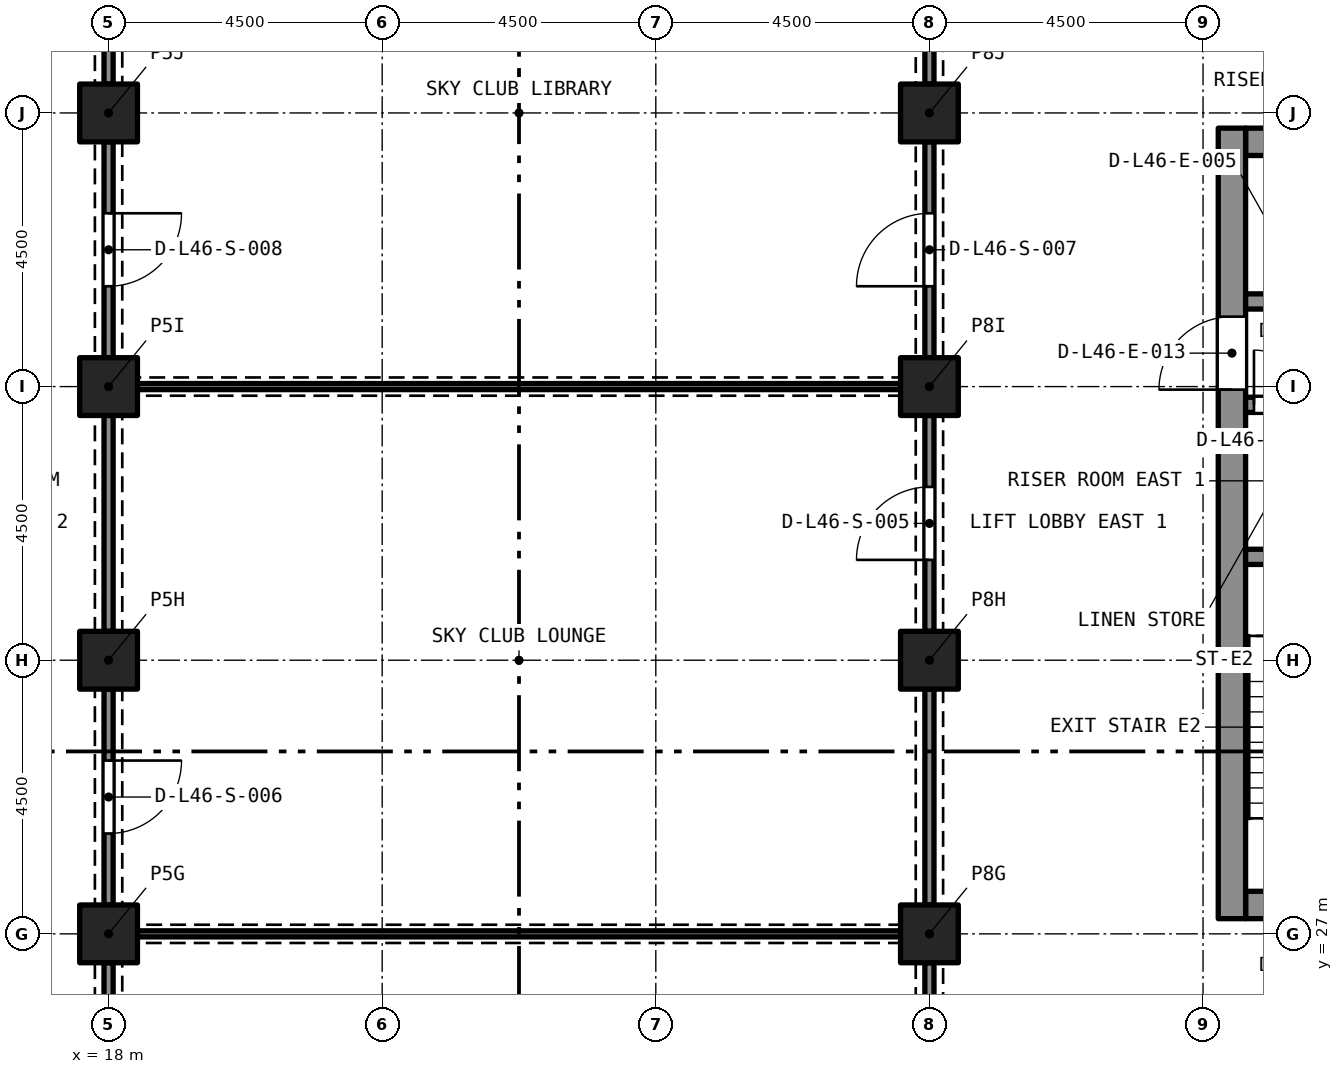
"""IFC4 building model, lengths in metres.
Left out: names, types, materials, properties, quantities, classifications, styles, units other than length and angle.
Written with IfcOpenShell. Run it as: python <this file> out.ifc"""

import sys

from ifc_helpers import new_model, si_unit, direction, frame, frame_2d, origin, origin_2d, place, context, subcontext, project, spatial, rectangle, extrude, element, fill, save


model = new_model("IFC4")
c1 = context("Model", 3, precision=1e-05, world=origin(), true_north=direction((0.0, 1.0)))
c2 = subcontext(c1, "Body", "Model", "MODEL_VIEW")
j1 = project(units=[si_unit("LENGTHUNIT", "METRE"), si_unit("PLANEANGLEUNIT", "RADIAN")], contexts=[c1])
p1 = place(None, origin())
s1 = spatial("IfcSite", under=j1, at=p1, CompositionType="ELEMENT")
p2 = place(p1, origin())
s2 = spatial("IfcBuilding", under=s1, at=p2, CompositionType="ELEMENT")
p3 = place(p2, frame((0.0, 0.0, 168.2)))
s3 = spatial("IfcBuildingStorey", under=s2, at=p3, CompositionType="ELEMENT", Elevation=168.2)
for number, where, z_axis, x_axis in (
    (1, (18.0, 27.0, 0.0), (0.0, 0.0, 1.0), (1.0, 0.0, 0.0)),
    (2, (31.5, 27.0, 0.0), (0.0, 0.0, 1.0), (1.0, 0.0, 0.0)),
    (3, (18.0, 31.5, 0.0), (0.0, 0.0, 1.0), (1.0, 0.0, 0.0)),
    (4, (31.5, 31.5, 0.0), (0.0, 0.0, 1.0), (1.0, 0.0, 0.0)),
    (5, (18.0, 36.0, 0.0), (0.0, 0.0, 1.0), (1.0, 0.0, 0.0)),
    (6, (31.5, 36.0, 0.0), (0.0, 0.0, 1.0), (1.0, 0.0, 0.0)),
    (7, (18.0, 40.5, 0.0), (0.0, 0.0, 1.0), (1.0, 0.0, 0.0)),
    (8, (31.5, 40.5, 0.0), (0.0, 0.0, 1.0), (1.0, 0.0, 0.0)),
):
    element("IfcColumn", number, at=place(p3, frame(where, z_axis=z_axis, x_axis=x_axis)), inside=s3, PredefinedType="COLUMN", context=c2, shape_type="SweptSolid", body=[
        extrude(rectangle(XDim=0.95, YDim=0.95, at=origin_2d()), origin(), (0.0, 0.0, 1.0), 4.4),
    ])
p4 = place(p3, frame((36.7, 27.475, 0.0), z_axis=(0.0, 0.0, 1.0), x_axis=(1.0, 0.0, 0.0)))
e9 = element("IfcWall", 9, at=p4, inside=s3, PredefinedType="SOLIDWALL", context=c2, shape_type="SweptSolid", body=[
    extrude(rectangle(XDim=7.6, YDim=0.45, at=frame_2d((3.8, 0.0))), origin(), (0.0, 0.0, 1.0), 4.4),
])
p5 = place(p4, frame((5.775, 0.0, 0.0)))
e10 = element("IfcOpeningElement", 10, at=p5, cuts=e9, PredefinedType="OPENING", context=c2, shape_type="SweptSolid", body=[
    extrude(rectangle(XDim=1.1, YDim=2.1, at=frame_2d((0.55, 1.05))), frame((0.0, 0.235, 0.0), z_axis=(0.0, -1.0, 0.0), x_axis=(1.0, 0.0, 0.0)), (0.0, 0.0, 1.0), 0.47),
])
p6 = place(p4, frame((3.25, 0.0, 0.0)))
e11 = element("IfcOpeningElement", 11, at=p6, cuts=e9, PredefinedType="OPENING", context=c2, shape_type="SweptSolid", body=[
    extrude(rectangle(XDim=1.1, YDim=2.1, at=frame_2d((0.55, 1.05))), frame((0.0, 0.235, 0.0), z_axis=(0.0, -1.0, 0.0), x_axis=(1.0, 0.0, 0.0)), (0.0, 0.0, 1.0), 0.47),
])
p7 = place(p4, frame((0.725, 0.0, 0.0)))
e12 = element("IfcOpeningElement", 12, at=p7, cuts=e9, PredefinedType="OPENING", context=c2, shape_type="SweptSolid", body=[
    extrude(rectangle(XDim=1.1, YDim=2.1, at=frame_2d((0.55, 1.05))), frame((0.0, 0.235, 0.0), z_axis=(0.0, -1.0, 0.0), x_axis=(1.0, 0.0, 0.0)), (0.0, 0.0, 1.0), 0.47),
])
p8 = place(p3, frame((36.7, 40.025, 0.0), z_axis=(0.0, 0.0, 1.0), x_axis=(1.0, 0.0, 0.0)))
e13 = element("IfcWall", 13, at=p8, inside=s3, PredefinedType="SOLIDWALL", context=c2, shape_type="SweptSolid", body=[
    extrude(rectangle(XDim=7.6, YDim=0.45, at=frame_2d((3.8, 0.0))), origin(), (0.0, 0.0, 1.0), 4.4),
])
p9 = place(p3, frame((36.475, 27.25, 0.0), z_axis=(0.0, 0.0, 1.0), x_axis=(0.0, 1.0, 0.0)))
e14 = element("IfcWall", 14, at=p9, inside=s3, PredefinedType="SOLIDWALL", context=c2, shape_type="SweptSolid", body=[
    extrude(rectangle(XDim=13.0, YDim=0.45, at=frame_2d((6.5, 0.0))), origin(), (0.0, 0.0, 1.0), 4.4),
])
p10 = place(p9, frame((8.7, 0.0, 0.0)))
e15 = element("IfcOpeningElement", 15, at=p10, cuts=e14, PredefinedType="OPENING", context=c2, shape_type="SweptSolid", body=[
    extrude(rectangle(XDim=1.2, YDim=2.1, at=frame_2d((0.6, 1.05))), frame((0.0, 0.235, 0.0), z_axis=(0.0, -1.0, 0.0), x_axis=(1.0, 0.0, 0.0)), (0.0, 0.0, 1.0), 0.47),
])
p11 = place(p3, frame((36.7, 33.2, 0.0), z_axis=(0.0, 0.0, 1.0), x_axis=(1.0, 0.0, 0.0)))
e16 = element("IfcWall", 16, at=p11, inside=s3, PredefinedType="SOLIDWALL", context=c2, shape_type="SweptSolid", body=[
    extrude(rectangle(XDim=7.6, YDim=0.25, at=frame_2d((3.8, 0.0))), origin(), (0.0, 0.0, 1.0), 4.1),
])
p12 = place(p11, frame((3.3, 0.0, 0.0)))
e17 = element("IfcOpeningElement", 17, at=p12, cuts=e16, PredefinedType="OPENING", context=c2, shape_type="SweptSolid", body=[
    extrude(rectangle(XDim=1.0, YDim=2.1, at=frame_2d((0.5, 1.05))), frame((0.0, 0.135, 0.0), z_axis=(0.0, -1.0, 0.0), x_axis=(1.0, 0.0, 0.0)), (0.0, 0.0, 1.0), 0.27),
])
p13 = place(p3, frame((36.7, 35.7, 0.0), z_axis=(0.0, 0.0, 1.0), x_axis=(1.0, 0.0, 0.0)))
e18 = element("IfcWall", 18, at=p13, inside=s3, PredefinedType="SOLIDWALL", context=c2, shape_type="SweptSolid", body=[
    extrude(rectangle(XDim=7.6, YDim=0.25, at=frame_2d((3.8, 0.0))), origin(), (0.0, 0.0, 1.0), 4.1),
])
p14 = place(p13, frame((5.775, 0.0, 0.0)))
e19 = element("IfcOpeningElement", 19, at=p14, cuts=e18, PredefinedType="OPENING", context=c2, shape_type="SweptSolid", body=[
    extrude(rectangle(XDim=1.1, YDim=2.4, at=frame_2d((0.55, 1.2))), frame((0.0, 0.135, 0.0), z_axis=(0.0, -1.0, 0.0), x_axis=(1.0, 0.0, 0.0)), (0.0, 0.0, 1.0), 0.27),
])
p15 = place(p13, frame((1.512, 0.0, 0.0)))
e20 = element("IfcOpeningElement", 20, at=p15, cuts=e18, PredefinedType="OPENING", context=c2, shape_type="SweptSolid", body=[
    extrude(rectangle(XDim=0.9, YDim=2.1, at=frame_2d((0.45, 1.05))), frame((0.0, 0.135, 0.0), z_axis=(0.0, -1.0, 0.0), x_axis=(1.0, 0.0, 0.0)), (0.0, 0.0, 1.0), 0.27),
])
p16 = place(p13, frame((0.137, 0.0, 0.0)))
e21 = element("IfcOpeningElement", 21, at=p16, cuts=e18, PredefinedType="OPENING", context=c2, shape_type="SweptSolid", body=[
    extrude(rectangle(XDim=0.9, YDim=2.1, at=frame_2d((0.45, 1.05))), frame((0.0, 0.135, 0.0), z_axis=(0.0, -1.0, 0.0), x_axis=(1.0, 0.0, 0.0)), (0.0, 0.0, 1.0), 0.27),
])
p17 = place(p3, frame((36.7, 37.4, 0.0), z_axis=(0.0, 0.0, 1.0), x_axis=(1.0, 0.0, 0.0)))
e22 = element("IfcWall", 22, at=p17, inside=s3, PredefinedType="SOLIDWALL", context=c2, shape_type="SweptSolid", body=[
    extrude(rectangle(XDim=7.6, YDim=0.25, at=frame_2d((3.8, 0.0))), origin(), (0.0, 0.0, 1.0), 4.1),
])
p18 = place(p17, frame((0.75, 0.0, 0.0)))
e23 = element("IfcOpeningElement", 23, at=p18, cuts=e22, PredefinedType="OPENING", context=c2, shape_type="SweptSolid", body=[
    extrude(rectangle(XDim=0.7, YDim=2.1, at=frame_2d((0.35, 1.05))), frame((0.0, 0.135, 0.0), z_axis=(0.0, -1.0, 0.0), x_axis=(1.0, 0.0, 0.0)), (0.0, 0.0, 1.0), 0.27),
])
p19 = place(p17, frame((5.9, 0.0, 0.0)))
e24 = element("IfcOpeningElement", 24, at=p19, cuts=e22, PredefinedType="OPENING", context=c2, shape_type="SweptSolid", body=[
    extrude(rectangle(XDim=0.9, YDim=2.1, at=frame_2d((0.45, 1.05))), frame((0.0, 0.135, 0.0), z_axis=(0.0, -1.0, 0.0), x_axis=(1.0, 0.0, 0.0)), (0.0, 0.0, 1.0), 0.27),
])
p20 = place(p17, frame((3.2, 0.0, 0.0)))
e25 = element("IfcOpeningElement", 25, at=p20, cuts=e22, PredefinedType="OPENING", context=c2, shape_type="SweptSolid", body=[
    extrude(rectangle(XDim=0.9, YDim=2.1, at=frame_2d((0.45, 1.05))), frame((0.0, 0.135, 0.0), z_axis=(0.0, -1.0, 0.0), x_axis=(1.0, 0.0, 0.0)), (0.0, 0.0, 1.0), 0.27),
])
p21 = place(p3, frame((18.475, 27.0, 0.0), z_axis=(0.0, 0.0, 1.0), x_axis=(1.0, 0.0, 0.0)))
e26 = element("IfcWall", 26, at=p21, inside=s3, PredefinedType="PARTITIONING", context=c2, shape_type="SweptSolid", body=[
    extrude(rectangle(XDim=12.55, YDim=0.1, at=frame_2d((6.275, 0.0))), origin(), (0.0, 0.0, 1.0), 3.95),
])
p22 = place(p3, frame((31.5, 22.975, 0.0), z_axis=(0.0, 0.0, 1.0), x_axis=(0.0, 1.0, 0.0)))
e27 = element("IfcWall", 27, at=p22, inside=s3, PredefinedType="PARTITIONING", context=c2, shape_type="SweptSolid", body=[
    extrude(rectangle(XDim=3.55, YDim=0.15, at=frame_2d((1.775, 0.0))), origin(), (0.0, 0.0, 1.0), 3.58),
])
p23 = place(p22, frame((1.175, 0.0, 0.0)))
e28 = element("IfcOpeningElement", 28, at=p23, cuts=e27, PredefinedType="OPENING", context=c2, shape_type="SweptSolid", body=[
    extrude(rectangle(XDim=1.2, YDim=2.1, at=frame_2d((0.6, 1.05))), frame((0.0, 0.085, 0.0), z_axis=(0.0, -1.0, 0.0), x_axis=(1.0, 0.0, 0.0)), (0.0, 0.0, 1.0), 0.17),
])
p24 = place(p3, frame((18.0, 26.525, 0.0), z_axis=(0.0, 0.0, 1.0), x_axis=(0.0, -1.0, 0.0)))
e29 = element("IfcWall", 29, at=p24, inside=s3, PredefinedType="PARTITIONING", context=c2, shape_type="SweptSolid", body=[
    extrude(rectangle(XDim=3.55, YDim=0.15, at=frame_2d((1.775, 0.0))), origin(), (0.0, 0.0, 1.0), 3.58),
])
p25 = place(p24, frame((1.175, 0.0, 0.0)))
e30 = element("IfcOpeningElement", 30, at=p25, cuts=e29, PredefinedType="OPENING", context=c2, shape_type="SweptSolid", body=[
    extrude(rectangle(XDim=1.2, YDim=2.1, at=frame_2d((0.6, 1.05))), frame((0.0, 0.085, 0.0), z_axis=(0.0, -1.0, 0.0), x_axis=(1.0, 0.0, 0.0)), (0.0, 0.0, 1.0), 0.17),
])
p26 = place(p3, frame((18.475, 36.0, 0.0), z_axis=(0.0, 0.0, 1.0), x_axis=(1.0, 0.0, 0.0)))
e31 = element("IfcWall", 31, at=p26, inside=s3, PredefinedType="PARTITIONING", context=c2, shape_type="SweptSolid", body=[
    extrude(rectangle(XDim=12.55, YDim=0.1, at=frame_2d((6.275, 0.0))), origin(), (0.0, 0.0, 1.0), 3.95),
])
p27 = place(p3, frame((31.5, 31.975, 0.0), z_axis=(0.0, 0.0, 1.0), x_axis=(0.0, 1.0, 0.0)))
e32 = element("IfcWall", 32, at=p27, inside=s3, PredefinedType="PARTITIONING", context=c2, shape_type="SweptSolid", body=[
    extrude(rectangle(XDim=3.55, YDim=0.15, at=frame_2d((1.775, 0.0))), origin(), (0.0, 0.0, 1.0), 3.58),
])
p28 = place(p27, frame((1.175, 0.0, 0.0)))
e33 = element("IfcOpeningElement", 33, at=p28, cuts=e32, PredefinedType="OPENING", context=c2, shape_type="SweptSolid", body=[
    extrude(rectangle(XDim=1.2, YDim=2.1, at=frame_2d((0.6, 1.05))), frame((0.0, 0.085, 0.0), z_axis=(0.0, -1.0, 0.0), x_axis=(1.0, 0.0, 0.0)), (0.0, 0.0, 1.0), 0.17),
])
p29 = place(p3, frame((31.5, 27.475, 0.0), z_axis=(0.0, 0.0, 1.0), x_axis=(0.0, 1.0, 0.0)))
e34 = element("IfcWall", 34, at=p29, inside=s3, PredefinedType="PARTITIONING", context=c2, shape_type="SweptSolid", body=[
    extrude(rectangle(XDim=3.55, YDim=0.15, at=frame_2d((1.775, 0.0))), origin(), (0.0, 0.0, 1.0), 3.58),
])
p30 = place(p3, frame((18.0, 31.025, 0.0), z_axis=(0.0, 0.0, 1.0), x_axis=(0.0, -1.0, 0.0)))
e35 = element("IfcWall", 35, at=p30, inside=s3, PredefinedType="PARTITIONING", context=c2, shape_type="SweptSolid", body=[
    extrude(rectangle(XDim=3.55, YDim=0.15, at=frame_2d((1.775, 0.0))), origin(), (0.0, 0.0, 1.0), 3.58),
])
p31 = place(p30, frame((1.175, 0.0, 0.0)))
e36 = element("IfcOpeningElement", 36, at=p31, cuts=e35, PredefinedType="OPENING", context=c2, shape_type="SweptSolid", body=[
    extrude(rectangle(XDim=1.2, YDim=2.1, at=frame_2d((0.6, 1.05))), frame((0.0, 0.085, 0.0), z_axis=(0.0, -1.0, 0.0), x_axis=(1.0, 0.0, 0.0)), (0.0, 0.0, 1.0), 0.17),
])
p32 = place(p3, frame((18.0, 31.975, 0.0), z_axis=(0.0, 0.0, 1.0), x_axis=(0.0, 1.0, 0.0)))
e37 = element("IfcWall", 37, at=p32, inside=s3, PredefinedType="PARTITIONING", context=c2, shape_type="SweptSolid", body=[
    extrude(rectangle(XDim=3.55, YDim=0.15, at=frame_2d((1.775, 0.0))), origin(), (0.0, 0.0, 1.0), 3.58),
])
p33 = place(p3, frame((31.5, 36.475, 0.0), z_axis=(0.0, 0.0, 1.0), x_axis=(0.0, 1.0, 0.0)))
e38 = element("IfcWall", 38, at=p33, inside=s3, PredefinedType="PARTITIONING", context=c2, shape_type="SweptSolid", body=[
    extrude(rectangle(XDim=3.55, YDim=0.15, at=frame_2d((1.775, 0.0))), origin(), (0.0, 0.0, 1.0), 3.58),
])
p34 = place(p33, frame((1.175, 0.0, 0.0)))
e39 = element("IfcOpeningElement", 39, at=p34, cuts=e38, PredefinedType="OPENING", context=c2, shape_type="SweptSolid", body=[
    extrude(rectangle(XDim=1.2, YDim=2.1, at=frame_2d((0.6, 1.05))), frame((0.0, 0.085, 0.0), z_axis=(0.0, -1.0, 0.0), x_axis=(1.0, 0.0, 0.0)), (0.0, 0.0, 1.0), 0.17),
])
p35 = place(p3, frame((31.5, 40.975, 0.0), z_axis=(0.0, 0.0, 1.0), x_axis=(0.0, 1.0, 0.0)))
e40 = element("IfcWall", 40, at=p35, inside=s3, PredefinedType="PARTITIONING", context=c2, shape_type="SweptSolid", body=[
    extrude(rectangle(XDim=3.55, YDim=0.15, at=frame_2d((1.775, 0.0))), origin(), (0.0, 0.0, 1.0), 3.58),
])
p36 = place(p3, frame((18.0, 40.025, 0.0), z_axis=(0.0, 0.0, 1.0), x_axis=(0.0, -1.0, 0.0)))
e41 = element("IfcWall", 41, at=p36, inside=s3, PredefinedType="PARTITIONING", context=c2, shape_type="SweptSolid", body=[
    extrude(rectangle(XDim=3.55, YDim=0.15, at=frame_2d((1.775, 0.0))), origin(), (0.0, 0.0, 1.0), 3.58),
])
p37 = place(p36, frame((1.175, 0.0, 0.0)))
e42 = element("IfcOpeningElement", 42, at=p37, cuts=e41, PredefinedType="OPENING", context=c2, shape_type="SweptSolid", body=[
    extrude(rectangle(XDim=1.2, YDim=2.1, at=frame_2d((0.6, 1.05))), frame((0.0, 0.085, 0.0), z_axis=(0.0, -1.0, 0.0), x_axis=(1.0, 0.0, 0.0)), (0.0, 0.0, 1.0), 0.17),
])
p38 = place(p3, frame((18.0, 40.975, 0.0), z_axis=(0.0, 0.0, 1.0), x_axis=(0.0, 1.0, 0.0)))
e43 = element("IfcWall", 43, at=p38, inside=s3, PredefinedType="PARTITIONING", context=c2, shape_type="SweptSolid", body=[
    extrude(rectangle(XDim=3.55, YDim=0.15, at=frame_2d((1.775, 0.0))), origin(), (0.0, 0.0, 1.0), 3.58),
])
p39 = place(p16, origin())
e44 = element("IfcDoor", 44, at=p39, inside=s3, OperationType="SINGLE_SWING_LEFT", PredefinedType="DOOR", context=c2, shape_type="SweptSolid", body=[
    extrude(rectangle(XDim=0.9, YDim=2.1, at=frame_2d((0.45, 1.05))), frame((0.0, 0.025, 0.0), z_axis=(0.0, -1.0, 0.0), x_axis=(1.0, 0.0, 0.0)), (0.0, 0.0, 1.0), 0.05),
])
fill(e21, e44)
p40 = place(p10, origin())
e45 = element("IfcDoor", 45, at=p40, inside=s3, OperationType="SINGLE_SWING_LEFT", PredefinedType="DOOR", context=c2, shape_type="SweptSolid", body=[
    extrude(rectangle(XDim=1.2, YDim=2.1, at=frame_2d((0.6, 1.05))), frame((0.0, 0.025, 0.0), z_axis=(0.0, -1.0, 0.0), x_axis=(1.0, 0.0, 0.0)), (0.0, 0.0, 1.0), 0.05),
])
fill(e15, e45)
p41 = place(p28, origin())
e46 = element("IfcDoor", 46, at=p41, inside=s3, OperationType="SINGLE_SWING_LEFT", PredefinedType="DOOR", context=c2, shape_type="SweptSolid", body=[
    extrude(rectangle(XDim=1.2, YDim=2.1, at=frame_2d((0.6, 1.05))), frame((0.0, 0.025, 0.0), z_axis=(0.0, -1.0, 0.0), x_axis=(1.0, 0.0, 0.0)), (0.0, 0.0, 1.0), 0.05),
])
fill(e33, e46)
p42 = place(p31, origin())
e47 = element("IfcDoor", 47, at=p42, inside=s3, OperationType="SINGLE_SWING_LEFT", PredefinedType="DOOR", context=c2, shape_type="SweptSolid", body=[
    extrude(rectangle(XDim=1.2, YDim=2.1, at=frame_2d((0.6, 1.05))), frame((0.0, 0.025, 0.0), z_axis=(0.0, -1.0, 0.0), x_axis=(1.0, 0.0, 0.0)), (0.0, 0.0, 1.0), 0.05),
])
fill(e36, e47)
p43 = place(p34, origin())
e48 = element("IfcDoor", 48, at=p43, inside=s3, OperationType="SINGLE_SWING_LEFT", PredefinedType="DOOR", context=c2, shape_type="SweptSolid", body=[
    extrude(rectangle(XDim=1.2, YDim=2.1, at=frame_2d((0.6, 1.05))), frame((0.0, 0.025, 0.0), z_axis=(0.0, -1.0, 0.0), x_axis=(1.0, 0.0, 0.0)), (0.0, 0.0, 1.0), 0.05),
])
fill(e39, e48)
p44 = place(p37, origin())
e49 = element("IfcDoor", 49, at=p44, inside=s3, OperationType="SINGLE_SWING_LEFT", PredefinedType="DOOR", context=c2, shape_type="SweptSolid", body=[
    extrude(rectangle(XDim=1.2, YDim=2.1, at=frame_2d((0.6, 1.05))), frame((0.0, 0.025, 0.0), z_axis=(0.0, -1.0, 0.0), x_axis=(1.0, 0.0, 0.0)), (0.0, 0.0, 1.0), 0.05),
])
fill(e42, e49)
save(model, sys.argv[1])
